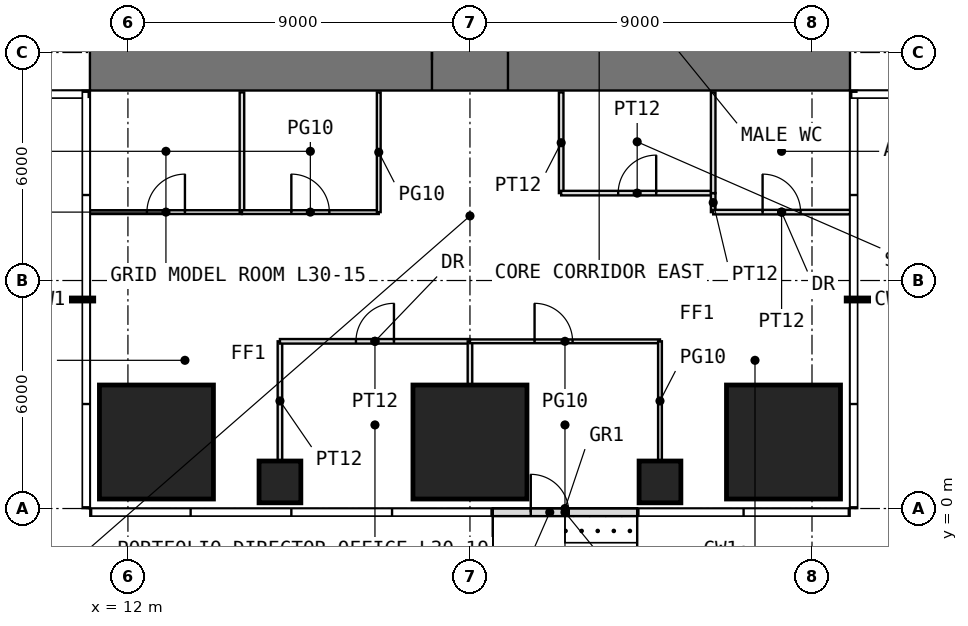
"""IFC4 building model, lengths in metres.
Left out: names, types, materials, properties, quantities, classifications, styles, units other than length and angle.
Written with IfcOpenShell. Run it as: python <this file> out.ifc"""

import sys

from ifc_helpers import new_model, si_unit, direction, frame, frame_2d, origin, origin_2d, place, context, subcontext, project, spatial, rectangle, extrude, element, fill, save


model = new_model("IFC4")
c1 = context("Model", 3, precision=1e-05, world=origin(), true_north=direction((0.0, 1.0)))
c2 = subcontext(c1, "Body", "Model", "MODEL_VIEW")
j1 = project(units=[si_unit("LENGTHUNIT", "METRE"), si_unit("PLANEANGLEUNIT", "RADIAN")], contexts=[c1])
p1 = place(None, origin())
s1 = spatial("IfcSite", under=j1, at=p1, CompositionType="ELEMENT")
p2 = place(p1, origin())
s2 = spatial("IfcBuilding", under=s1, at=p2, CompositionType="ELEMENT")
p3 = place(p2, frame((0.0, 0.0, 128.5)))
s3 = spatial("IfcBuildingStorey", under=s2, at=p3, CompositionType="ELEMENT", Elevation=128.5)
p4 = place(p3, frame((12.75, 1.75, 0.0), z_axis=(0.0, 0.0, 1.0), x_axis=(1.0, 0.0, 0.0)))
e1 = element("IfcColumn", 1, at=p4, inside=s3, PredefinedType="COLUMN", context=c2, shape_type="SweptSolid", body=[
    extrude(rectangle(XDim=3.0, YDim=3.0, at=origin_2d()), origin(), (0.0, 0.0, 1.0), 4.0),
])
p5 = place(p3, frame((16.0, 0.7, 0.0), z_axis=(0.0, 0.0, 1.0), x_axis=(1.0, 0.0, 0.0)))
e2 = element("IfcColumn", 2, at=p5, inside=s3, PredefinedType="COLUMN", context=c2, shape_type="SweptSolid", body=[
    extrude(rectangle(XDim=1.1, YDim=1.1, at=origin_2d()), origin(), (0.0, 0.0, 1.0), 4.0),
])
p6 = place(p3, frame((21.0, 1.75, 0.0), z_axis=(0.0, 0.0, 1.0), x_axis=(1.0, 0.0, 0.0)))
e3 = element("IfcColumn", 3, at=p6, inside=s3, PredefinedType="COLUMN", context=c2, shape_type="SweptSolid", body=[
    extrude(rectangle(XDim=3.0, YDim=3.0, at=origin_2d()), origin(), (0.0, 0.0, 1.0), 4.0),
])
p7 = place(p3, frame((26.0, 0.7, 0.0), z_axis=(0.0, 0.0, 1.0), x_axis=(1.0, 0.0, 0.0)))
e4 = element("IfcColumn", 4, at=p7, inside=s3, PredefinedType="COLUMN", context=c2, shape_type="SweptSolid", body=[
    extrude(rectangle(XDim=1.1, YDim=1.1, at=origin_2d()), origin(), (0.0, 0.0, 1.0), 4.0),
])
p8 = place(p3, frame((29.25, 1.75, 0.0), z_axis=(0.0, 0.0, 1.0), x_axis=(1.0, 0.0, 0.0)))
e5 = element("IfcColumn", 5, at=p8, inside=s3, PredefinedType="COLUMN", context=c2, shape_type="SweptSolid", body=[
    extrude(rectangle(XDim=3.0, YDim=3.0, at=origin_2d()), origin(), (0.0, 0.0, 1.0), 4.0),
])
p9 = place(p3, frame((21.6, -0.1, 0.0), z_axis=(0.0, 0.0, 1.0), x_axis=(1.0, 0.0, 0.0)))
e6 = element("IfcWall", 6, at=p9, inside=s3, PredefinedType="USERDEFINED", context=c2, shape_type="SweptSolid", body=[
    extrude(rectangle(XDim=3.8, YDim=0.2, at=frame_2d((1.9, 0.0))), origin(), (0.0, 0.0, 1.0), 3.75),
])
p10 = place(p9, frame((1.0, 0.0, 0.0)))
e7 = element("IfcOpeningElement", 7, at=p10, cuts=e6, PredefinedType="OPENING", context=c2, shape_type="SweptSolid", body=[
    extrude(rectangle(XDim=1.0, YDim=2.4, at=frame_2d((0.5, 1.2))), frame((0.0, 0.11, 0.0), z_axis=(0.0, -1.0, 0.0), x_axis=(1.0, 0.0, 0.0)), (0.0, 0.0, 1.0), 0.22),
])
p11 = place(p3, frame((11.0, 11.8, -0.05), z_axis=(0.0, 0.0, 1.0), x_axis=(1.0, 0.0, 0.0)))
e8 = element("IfcWall", 8, at=p11, inside=s3, PredefinedType="SHEAR", context=c2, shape_type="SweptSolid", body=[
    extrude(rectangle(XDim=20.0, YDim=1.6, at=frame_2d((10.0, 0.0))), origin(), (0.0, 0.0, 1.0), 4.0),
])
p12 = place(p11, frame((9.0, 0.0, 0.05)))
e9 = element("IfcOpeningElement", 9, at=p12, cuts=e8, PredefinedType="OPENING", context=c2, shape_type="SweptSolid", body=[
    extrude(rectangle(XDim=2.0, YDim=2.2, at=frame_2d((1.0, 1.1))), frame((0.0, 0.81, 0.0), z_axis=(0.0, -1.0, 0.0), x_axis=(1.0, 0.0, 0.0)), (0.0, 0.0, 1.0), 1.62),
])
p13 = place(p3, frame((11.0, 7.8, 0.0), z_axis=(0.0, 0.0, 1.0), x_axis=(1.0, 0.0, 0.0)))
e10 = element("IfcWall", 10, at=p13, inside=s3, PredefinedType="PARTITIONING", context=c2, shape_type="SweptSolid", body=[
    extrude(rectangle(XDim=4.0, YDim=0.1, at=frame_2d((2.0, 0.0))), origin(), (0.0, 0.0, 1.0), 3.75),
])
p14 = place(p13, frame((1.5, 0.0, 0.0)))
e11 = element("IfcOpeningElement", 11, at=p14, cuts=e10, PredefinedType="OPENING", context=c2, shape_type="SweptSolid", body=[
    extrude(rectangle(XDim=1.0, YDim=2.4, at=frame_2d((0.5, 1.2))), frame((0.0, 0.06, 0.0), z_axis=(0.0, -1.0, 0.0), x_axis=(1.0, 0.0, 0.0)), (0.0, 0.0, 1.0), 0.12),
])
p15 = place(p3, frame((15.0, 7.8, 0.0), z_axis=(0.0, 0.0, 1.0), x_axis=(0.0, 1.0, 0.0)))
e12 = element("IfcWall", 12, at=p15, inside=s3, PredefinedType="PARTITIONING", context=c2, shape_type="SweptSolid", body=[
    extrude(rectangle(XDim=3.15, YDim=0.12, at=frame_2d((1.575, 0.0))), origin(), (0.0, 0.0, 1.0), 3.75),
])
p16 = place(p3, frame((15.0, 7.8, 0.0), z_axis=(0.0, 0.0, 1.0), x_axis=(1.0, 0.0, 0.0)))
e13 = element("IfcWall", 13, at=p16, inside=s3, PredefinedType="PARTITIONING", context=c2, shape_type="SweptSolid", body=[
    extrude(rectangle(XDim=3.6, YDim=0.1, at=frame_2d((1.8, 0.0))), origin(), (0.0, 0.0, 1.0), 3.75),
])
p17 = place(p16, frame((1.3, 0.0, 0.0)))
e14 = element("IfcOpeningElement", 14, at=p17, cuts=e13, PredefinedType="OPENING", context=c2, shape_type="SweptSolid", body=[
    extrude(rectangle(XDim=1.0, YDim=2.4, at=frame_2d((0.5, 1.2))), frame((0.0, 0.06, 0.0), z_axis=(0.0, -1.0, 0.0), x_axis=(1.0, 0.0, 0.0)), (0.0, 0.0, 1.0), 0.12),
])
p18 = place(p3, frame((16.0, 1.26, 0.0), z_axis=(0.0, 0.0, 1.0), x_axis=(0.0, 1.0, 0.0)))
e15 = element("IfcWall", 15, at=p18, inside=s3, PredefinedType="PARTITIONING", context=c2, shape_type="SweptSolid", body=[
    extrude(rectangle(XDim=3.14, YDim=0.12, at=frame_2d((1.57, 0.0))), origin(), (0.0, 0.0, 1.0), 3.75),
])
p19 = place(p3, frame((16.0, 4.4, 0.0), z_axis=(0.0, 0.0, 1.0), x_axis=(1.0, 0.0, 0.0)))
e16 = element("IfcWall", 16, at=p19, inside=s3, PredefinedType="PARTITIONING", context=c2, shape_type="SweptSolid", body=[
    extrude(rectangle(XDim=5.0, YDim=0.12, at=frame_2d((2.5, 0.0))), origin(), (0.0, 0.0, 1.0), 3.75),
])
p20 = place(p19, frame((2.0, 0.0, 0.0)))
e17 = element("IfcOpeningElement", 17, at=p20, cuts=e16, PredefinedType="OPENING", context=c2, shape_type="SweptSolid", body=[
    extrude(rectangle(XDim=1.0, YDim=2.2, at=frame_2d((0.5, 1.1))), frame((0.0, 0.07, 0.0), z_axis=(0.0, -1.0, 0.0), x_axis=(1.0, 0.0, 0.0)), (0.0, 0.0, 1.0), 0.14),
])
p21 = place(p3, frame((18.6, 7.8, 0.0), z_axis=(0.0, 0.0, 1.0), x_axis=(0.0, 1.0, 0.0)))
e18 = element("IfcWall", 18, at=p21, inside=s3, PredefinedType="PARTITIONING", context=c2, shape_type="SweptSolid", body=[
    extrude(rectangle(XDim=3.15, YDim=0.1, at=frame_2d((1.575, 0.0))), origin(), (0.0, 0.0, 1.0), 3.75),
])
p22 = place(p3, frame((21.0, 3.26, 0.0), z_axis=(0.0, 0.0, 1.0), x_axis=(0.0, 1.0, 0.0)))
e19 = element("IfcWall", 19, at=p22, inside=s3, PredefinedType="PARTITIONING", context=c2, shape_type="SweptSolid", body=[
    extrude(rectangle(XDim=1.14, YDim=0.12, at=frame_2d((0.57, 0.0))), origin(), (0.0, 0.0, 1.0), 3.75),
])
p23 = place(p3, frame((21.0, 4.4, 0.0), z_axis=(0.0, 0.0, 1.0), x_axis=(1.0, 0.0, 0.0)))
e20 = element("IfcWall", 20, at=p23, inside=s3, PredefinedType="PARTITIONING", context=c2, shape_type="SweptSolid", body=[
    extrude(rectangle(XDim=5.0, YDim=0.1, at=frame_2d((2.5, 0.0))), origin(), (0.0, 0.0, 1.0), 3.75),
])
p24 = place(p23, frame((1.7, 0.0, 0.0)))
e21 = element("IfcOpeningElement", 21, at=p24, cuts=e20, PredefinedType="OPENING", context=c2, shape_type="SweptSolid", body=[
    extrude(rectangle(XDim=1.0, YDim=2.4, at=frame_2d((0.5, 1.2))), frame((0.0, 0.06, 0.0), z_axis=(0.0, -1.0, 0.0), x_axis=(1.0, 0.0, 0.0)), (0.0, 0.0, 1.0), 0.12),
])
p25 = place(p3, frame((23.4, 8.3, 0.0), z_axis=(0.0, 0.0, 1.0), x_axis=(0.0, 1.0, 0.0)))
e22 = element("IfcWall", 22, at=p25, inside=s3, PredefinedType="PARTITIONING", context=c2, shape_type="SweptSolid", body=[
    extrude(rectangle(XDim=2.65, YDim=0.12, at=frame_2d((1.325, 0.0))), origin(), (0.0, 0.0, 1.0), 3.75),
])
p26 = place(p3, frame((23.4, 8.3, 0.0), z_axis=(0.0, 0.0, 1.0), x_axis=(1.0, 0.0, 0.0)))
e23 = element("IfcWall", 23, at=p26, inside=s3, PredefinedType="PARTITIONING", context=c2, shape_type="SweptSolid", body=[
    extrude(rectangle(XDim=4.0, YDim=0.12, at=frame_2d((2.0, 0.0))), origin(), (0.0, 0.0, 1.0), 3.75),
])
p27 = place(p26, frame((1.5, 0.0, 0.0)))
e24 = element("IfcOpeningElement", 24, at=p27, cuts=e23, PredefinedType="OPENING", context=c2, shape_type="SweptSolid", body=[
    extrude(rectangle(XDim=1.0, YDim=2.2, at=frame_2d((0.5, 1.1))), frame((0.0, 0.07, 0.0), z_axis=(0.0, -1.0, 0.0), x_axis=(1.0, 0.0, 0.0)), (0.0, 0.0, 1.0), 0.14),
])
p28 = place(p3, frame((26.0, 1.26, 0.0), z_axis=(0.0, 0.0, 1.0), x_axis=(0.0, 1.0, 0.0)))
e25 = element("IfcWall", 25, at=p28, inside=s3, PredefinedType="PARTITIONING", context=c2, shape_type="SweptSolid", body=[
    extrude(rectangle(XDim=3.14, YDim=0.1, at=frame_2d((1.57, 0.0))), origin(), (0.0, 0.0, 1.0), 3.75),
])
p29 = place(p3, frame((27.4, 7.8, 0.0), z_axis=(0.0, 0.0, 1.0), x_axis=(0.0, 1.0, 0.0)))
e26 = element("IfcWall", 26, at=p29, inside=s3, PredefinedType="PARTITIONING", context=c2, shape_type="SweptSolid", body=[
    extrude(rectangle(XDim=0.5, YDim=0.12, at=frame_2d((0.25, 0.0))), origin(), (0.0, 0.0, 1.0), 3.75),
])
p30 = place(p3, frame((27.4, 7.8, 0.0), z_axis=(0.0, 0.0, 1.0), x_axis=(1.0, 0.0, 0.0)))
e27 = element("IfcWall", 27, at=p30, inside=s3, PredefinedType="PARTITIONING", context=c2, shape_type="SweptSolid", body=[
    extrude(rectangle(XDim=3.6, YDim=0.12, at=frame_2d((1.8, 0.0))), origin(), (0.0, 0.0, 1.0), 3.75),
])
p31 = place(p30, frame((1.3, 0.0, 0.0)))
e28 = element("IfcOpeningElement", 28, at=p31, cuts=e27, PredefinedType="OPENING", context=c2, shape_type="SweptSolid", body=[
    extrude(rectangle(XDim=1.0, YDim=2.2, at=frame_2d((0.5, 1.1))), frame((0.0, 0.07, 0.0), z_axis=(0.0, -1.0, 0.0), x_axis=(1.0, 0.0, 0.0)), (0.0, 0.0, 1.0), 0.14),
])
p32 = place(p3, frame((27.4, 8.3, 0.0), z_axis=(0.0, 0.0, 1.0), x_axis=(0.0, 1.0, 0.0)))
e29 = element("IfcWall", 29, at=p32, inside=s3, PredefinedType="PARTITIONING", context=c2, shape_type="SweptSolid", body=[
    extrude(rectangle(XDim=2.65, YDim=0.12, at=frame_2d((1.325, 0.0))), origin(), (0.0, 0.0, 1.0), 3.75),
])
p33 = place(p10, origin())
e30 = element("IfcDoor", 30, at=p33, inside=s3, OperationType="SINGLE_SWING_LEFT", PredefinedType="DOOR", context=c2, shape_type="SweptSolid", body=[
    extrude(rectangle(XDim=1.0, YDim=2.4, at=frame_2d((0.5, 1.2))), frame((0.0, 0.025, 0.0), z_axis=(0.0, -1.0, 0.0), x_axis=(1.0, 0.0, 0.0)), (0.0, 0.0, 1.0), 0.05),
])
fill(e7, e30)
p34 = place(p12, origin())
e31 = element("IfcDoor", 31, at=p34, inside=s3, OperationType="DOUBLE_DOOR_SINGLE_SWING", PredefinedType="DOOR", context=c2, shape_type="SweptSolid", body=[
    extrude(rectangle(XDim=2.0, YDim=2.2, at=frame_2d((1.0, 1.1))), frame((0.0, 0.025, 0.0), z_axis=(0.0, -1.0, 0.0), x_axis=(1.0, 0.0, 0.0)), (0.0, 0.0, 1.0), 0.05),
])
fill(e9, e31)
p35 = place(p14, origin())
e32 = element("IfcDoor", 32, at=p35, inside=s3, OperationType="SINGLE_SWING_RIGHT", PredefinedType="DOOR", context=c2, shape_type="SweptSolid", body=[
    extrude(rectangle(XDim=1.0, YDim=2.4, at=frame_2d((0.5, 1.2))), frame((0.0, 0.025, 0.0), z_axis=(0.0, -1.0, 0.0), x_axis=(1.0, 0.0, 0.0)), (0.0, 0.0, 1.0), 0.05),
])
fill(e11, e32)
p36 = place(p17, origin())
e33 = element("IfcDoor", 33, at=p36, inside=s3, OperationType="SINGLE_SWING_LEFT", PredefinedType="DOOR", context=c2, shape_type="SweptSolid", body=[
    extrude(rectangle(XDim=1.0, YDim=2.4, at=frame_2d((0.5, 1.2))), frame((0.0, 0.025, 0.0), z_axis=(0.0, -1.0, 0.0), x_axis=(1.0, 0.0, 0.0)), (0.0, 0.0, 1.0), 0.05),
])
fill(e14, e33)
p37 = place(p27, origin())
e34 = element("IfcDoor", 34, at=p37, inside=s3, OperationType="SINGLE_SWING_RIGHT", PredefinedType="DOOR", context=c2, shape_type="SweptSolid", body=[
    extrude(rectangle(XDim=1.0, YDim=2.2, at=frame_2d((0.5, 1.1))), frame((0.0, 0.025, 0.0), z_axis=(0.0, -1.0, 0.0), x_axis=(1.0, 0.0, 0.0)), (0.0, 0.0, 1.0), 0.05),
])
fill(e24, e34)
p38 = place(p31, origin())
e35 = element("IfcDoor", 35, at=p38, inside=s3, OperationType="SINGLE_SWING_LEFT", PredefinedType="DOOR", context=c2, shape_type="SweptSolid", body=[
    extrude(rectangle(XDim=1.0, YDim=2.2, at=frame_2d((0.5, 1.1))), frame((0.0, 0.025, 0.0), z_axis=(0.0, -1.0, 0.0), x_axis=(1.0, 0.0, 0.0)), (0.0, 0.0, 1.0), 0.05),
])
fill(e28, e35)
p39 = place(p20, origin())
e36 = element("IfcDoor", 36, at=p39, inside=s3, OperationType="SINGLE_SWING_RIGHT", PredefinedType="DOOR", context=c2, shape_type="SweptSolid", body=[
    extrude(rectangle(XDim=1.0, YDim=2.2, at=frame_2d((0.5, 1.1))), frame((0.0, 0.025, 0.0), z_axis=(0.0, -1.0, 0.0), x_axis=(1.0, 0.0, 0.0)), (0.0, 0.0, 1.0), 0.05),
])
fill(e17, e36)
p40 = place(p24, origin())
e37 = element("IfcDoor", 37, at=p40, inside=s3, OperationType="SINGLE_SWING_LEFT", PredefinedType="DOOR", context=c2, shape_type="SweptSolid", body=[
    extrude(rectangle(XDim=1.0, YDim=2.4, at=frame_2d((0.5, 1.2))), frame((0.0, 0.025, 0.0), z_axis=(0.0, -1.0, 0.0), x_axis=(1.0, 0.0, 0.0)), (0.0, 0.0, 1.0), 0.05),
])
fill(e21, e37)
save(model, sys.argv[1])
